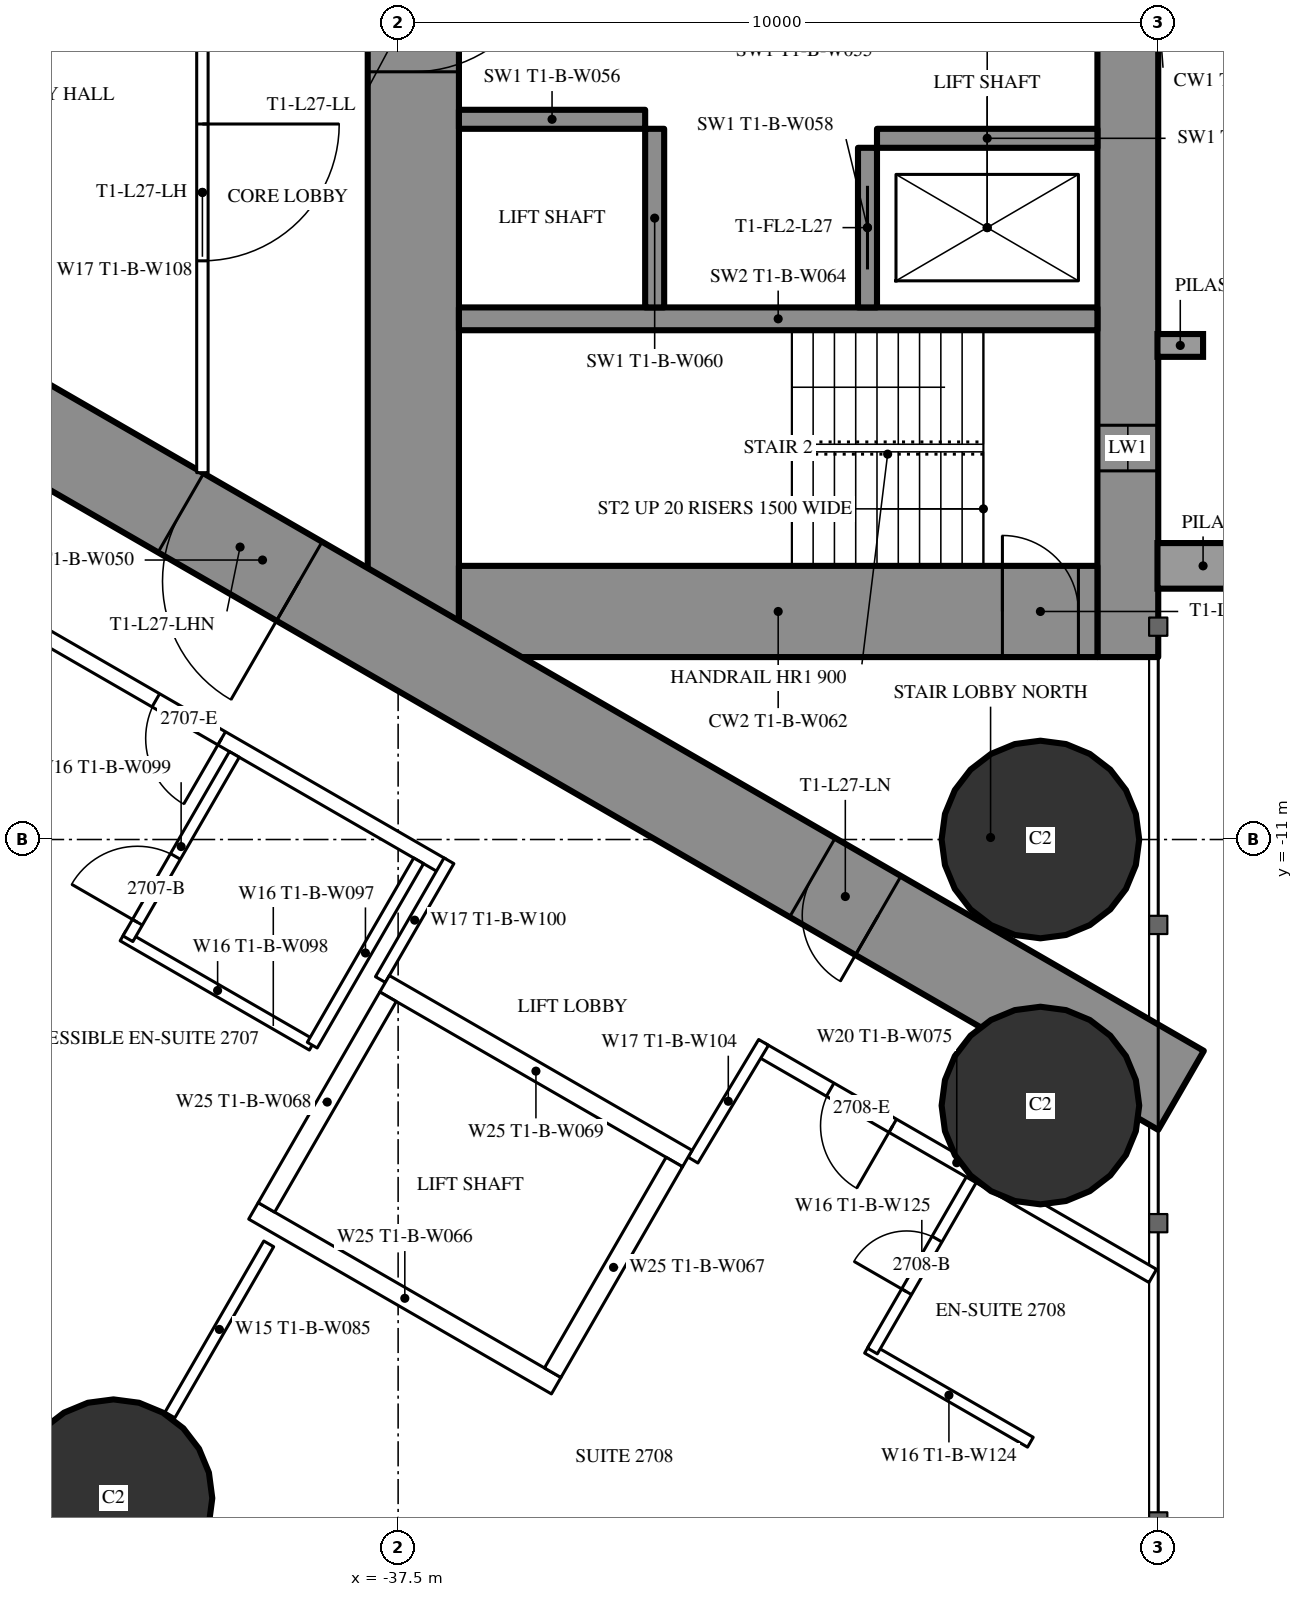
"""IFC4 building model, lengths in metres.
Left out: names, types, materials, properties, quantities, classifications, styles, units other than length and angle.
Written with IfcOpenShell. Run it as: python <this file> out.ifc"""

import sys

from ifc_helpers import new_model, si_unit, direction, frame, frame_2d, origin, origin_2d, place, context, subcontext, project, spatial, rectangle, hollow_circle, extrude, element, fill, save


model = new_model("IFC4")
c1 = context("Model", 3, precision=1e-05, world=origin(), true_north=direction((0.0, 1.0)))
c2 = subcontext(c1, "Body", "Model", "MODEL_VIEW")
j1 = project(units=[si_unit("LENGTHUNIT", "METRE"), si_unit("PLANEANGLEUNIT", "RADIAN")], contexts=[c1])
p1 = place(None, origin())
s1 = spatial("IfcSite", under=j1, at=p1, CompositionType="ELEMENT")
p2 = place(p1, origin())
s2 = spatial("IfcBuilding", under=s1, at=p2, CompositionType="ELEMENT")
p3 = place(p2, frame((0.0, 0.0, 104.6)))
s3 = spatial("IfcBuildingStorey", under=s2, at=p3, CompositionType="ELEMENT", Elevation=104.6)
for number, where, z_axis, x_axis in (
    (1, (-29.05, -11.0, 0.0), (0.0, 0.0, 1.0), (1.0, 0.0, 0.0)),
    (2, (-29.05, -14.5, 0.0), (0.0, 0.0, 1.0), (1.0, 0.0, 0.0)),
    (3, (-41.245, -19.666, 0.0), (0.0, 0.0, 1.0), (1.0, 0.0, 0.0)),
):
    element("IfcColumn", number, at=place(p3, frame(where, z_axis=z_axis, x_axis=x_axis)), inside=s3, PredefinedType="COLUMN", context=c2, shape_type="SweptSolid", body=[
        extrude(hollow_circle(Radius=1.3, WallThickness=0.1, at=origin_2d()), origin(), (0.0, 0.0, 1.0), 3.5),
    ])
p4 = place(p3, frame((-27.9, 8.6, 0.0), z_axis=(0.0, 0.0, 1.0), x_axis=(0.0, -1.0, 0.0)))
e4 = element("IfcWall", 4, at=p4, inside=s3, PredefinedType="SHEAR", context=c2, shape_type="SweptSolid", body=[
    extrude(rectangle(XDim=17.2, YDim=0.8, at=frame_2d((8.6, 0.0))), origin(), (0.0, 0.0, 1.0), 3.5),
])
p5 = place(p4, frame((2.45, 0.0, 0.6)))
e5 = element("IfcOpeningElement", 5, at=p5, cuts=e4, PredefinedType="OPENING", context=c2, shape_type="SweptSolid", body=[
    extrude(rectangle(XDim=0.6, YDim=2.1, at=frame_2d((0.3, 1.05))), frame((0.0, 0.41, 0.0), z_axis=(0.0, -1.0, 0.0), x_axis=(1.0, 0.0, 0.0)), (0.0, 0.0, 1.0), 0.82),
])
p6 = place(p4, frame((14.15, 0.0, 0.6)))
e6 = element("IfcOpeningElement", 6, at=p6, cuts=e4, PredefinedType="OPENING", context=c2, shape_type="SweptSolid", body=[
    extrude(rectangle(XDim=0.6, YDim=2.1, at=frame_2d((0.3, 1.05))), frame((0.0, 0.41, 0.0), z_axis=(0.0, -1.0, 0.0), x_axis=(1.0, 0.0, 0.0)), (0.0, 0.0, 1.0), 0.82),
])
p7 = place(p3, frame((-37.3, 8.6, 0.0), z_axis=(0.0, 0.0, 1.0), x_axis=(0.0, -1.0, 0.0)))
e7 = element("IfcWall", 7, at=p7, inside=s3, PredefinedType="SHEAR", context=c2, shape_type="SweptSolid", body=[
    extrude(rectangle(XDim=17.2, YDim=1.2, at=frame_2d((8.6, 0.0))), origin(), (0.0, 0.0, 1.0), 3.5),
])
p8 = place(p7, frame((7.7, 0.0, 0.0)))
e8 = element("IfcOpeningElement", 8, at=p8, cuts=e7, PredefinedType="OPENING", context=c2, shape_type="SweptSolid", body=[
    extrude(rectangle(XDim=1.8, YDim=2.2, at=frame_2d((0.9, 1.1))), frame((0.0, 0.61, 0.0), z_axis=(0.0, -1.0, 0.0), x_axis=(1.0, 0.0, 0.0)), (0.0, 0.0, 1.0), 1.22),
])
p9 = place(p3, frame((-28.3, -8.0, 0.0), z_axis=(0.0, 0.0, 1.0), x_axis=(-1.0, 0.0, 0.0)))
e9 = element("IfcWall", 9, at=p9, inside=s3, PredefinedType="SHEAR", context=c2, shape_type="SweptSolid", body=[
    extrude(rectangle(XDim=8.4, YDim=1.2, at=frame_2d((4.2, 0.0))), origin(), (0.0, 0.0, 1.0), 3.5),
])
p10 = place(p9, frame((0.25, 0.0, 0.0)))
e10 = element("IfcOpeningElement", 10, at=p10, cuts=e9, PredefinedType="OPENING", context=c2, shape_type="SweptSolid", body=[
    extrude(rectangle(XDim=1.0, YDim=2.2, at=frame_2d((0.5, 1.1))), frame((0.0, 0.61, 0.0), z_axis=(0.0, -1.0, 0.0), x_axis=(1.0, 0.0, 0.0)), (0.0, 0.0, 1.0), 1.22),
])
p11 = place(p3, frame((-28.3, -4.15, 0.0), z_axis=(0.0, 0.0, 1.0), x_axis=(-1.0, 0.0, 0.0)))
e11 = element("IfcWall", 11, at=p11, inside=s3, PredefinedType="SHEAR", context=c2, shape_type="SweptSolid", body=[
    extrude(rectangle(XDim=8.4, YDim=0.3, at=frame_2d((4.2, 0.0))), origin(), (0.0, 0.0, 1.0), 3.5),
])
p12 = place(p3, frame((-31.325, -1.9, 0.0), z_axis=(0.0, 0.0, 1.0), x_axis=(0.0, -1.0, 0.0)))
e12 = element("IfcWall", 12, at=p12, inside=s3, PredefinedType="SHEAR", context=c2, shape_type="SweptSolid", body=[
    extrude(rectangle(XDim=2.1, YDim=0.25, at=frame_2d((1.05, 0.0))), origin(), (0.0, 0.0, 1.0), 3.5),
])
p13 = place(p12, frame((0.5, 0.0, 0.0)))
e13 = element("IfcOpeningElement", 13, at=p13, cuts=e12, PredefinedType="OPENING", context=c2, shape_type="SweptSolid", body=[
    extrude(rectangle(XDim=1.1, YDim=2.2, at=frame_2d((0.55, 1.1))), frame((0.0, 0.135, 0.0), z_axis=(0.0, -1.0, 0.0), x_axis=(1.0, 0.0, 0.0)), (0.0, 0.0, 1.0), 0.27),
])
p14 = place(p3, frame((-34.125, -1.65, 0.0), z_axis=(0.0, 0.0, 1.0), x_axis=(0.0, -1.0, 0.0)))
e14 = element("IfcWall", 14, at=p14, inside=s3, PredefinedType="SHEAR", context=c2, shape_type="SweptSolid", body=[
    extrude(rectangle(XDim=2.35, YDim=0.25, at=frame_2d((1.175, 0.0))), origin(), (0.0, 0.0, 1.0), 3.5),
])
p15 = place(p3, frame((-28.3, -1.775, 0.0), z_axis=(0.0, 0.0, 1.0), x_axis=(-1.0, 0.0, 0.0)))
e15 = element("IfcWall", 15, at=p15, inside=s3, PredefinedType="SHEAR", context=c2, shape_type="SweptSolid", body=[
    extrude(rectangle(XDim=2.9, YDim=0.25, at=frame_2d((1.45, 0.0))), origin(), (0.0, 0.0, 1.0), 3.5),
])
p16 = place(p3, frame((-34.25, -1.525, 0.0), z_axis=(0.0, 0.0, 1.0), x_axis=(-1.0, 0.0, 0.0)))
e16 = element("IfcWall", 16, at=p16, inside=s3, PredefinedType="SHEAR", context=c2, shape_type="SweptSolid", body=[
    extrude(rectangle(XDim=2.45, YDim=0.25, at=frame_2d((1.225, 0.0))), origin(), (0.0, 0.0, 1.0), 3.5),
])
p17 = place(p3, frame((-27.2, 14.3, 0.0), z_axis=(0.0, 0.0, 1.0), x_axis=(-0.866026593062, -0.499997940104, 0.0)))
e17 = element("IfcWall", 17, at=p17, inside=s3, PredefinedType="SHEAR", context=c2, shape_type="SweptSolid", body=[
    extrude(rectangle(XDim=28.946, YDim=1.2, at=frame_2d((14.473, 0.0))), origin(), (0.0, 0.0, 1.0), 3.5),
])
p18 = place(p17, frame((4.6, 0.0, 0.0)))
e18 = element("IfcOpeningElement", 18, at=p18, cuts=e17, PredefinedType="OPENING", context=c2, shape_type="SweptSolid", body=[
    extrude(rectangle(XDim=1.0, YDim=2.2, at=frame_2d((0.5, 1.1))), frame((0.0, 0.61, 0.0), z_axis=(0.0, -1.0, 0.0), x_axis=(1.0, 0.0, 0.0)), (0.0, 0.0, 1.0), 1.22),
])
p19 = place(p17, frame((13.395, 0.0, 0.0)))
e19 = element("IfcOpeningElement", 19, at=p19, cuts=e17, PredefinedType="OPENING", context=c2, shape_type="SweptSolid", body=[
    extrude(rectangle(XDim=1.8, YDim=2.2, at=frame_2d((0.9, 1.1))), frame((0.0, 0.61, 0.0), z_axis=(0.0, -1.0, 0.0), x_axis=(1.0, 0.0, 0.0)), (0.0, 0.0, 1.0), 1.22),
])
p20 = place(p3, frame((-27.2, -14.3, 0.0), z_axis=(0.0, 0.0, 1.0), x_axis=(-0.866024021859, 0.500002393557, 0.0)))
e20 = element("IfcWall", 20, at=p20, inside=s3, PredefinedType="SHEAR", context=c2, shape_type="SweptSolid", body=[
    extrude(rectangle(XDim=27.907, YDim=1.2, at=frame_2d((13.954, 0.0))), origin(), (0.0, 0.0, 1.0), 3.5),
])
p21 = place(p20, frame((4.6, 0.0, 0.0)))
e21 = element("IfcOpeningElement", 21, at=p21, cuts=e20, PredefinedType="OPENING", context=c2, shape_type="SweptSolid", body=[
    extrude(rectangle(XDim=1.0, YDim=2.2, at=frame_2d((0.5, 1.1))), frame((0.0, 0.61, 0.0), z_axis=(0.0, -1.0, 0.0), x_axis=(1.0, 0.0, 0.0)), (0.0, 0.0, 1.0), 1.22),
])
p22 = place(p20, frame((13.395, 0.0, 0.0)))
e22 = element("IfcOpeningElement", 22, at=p22, cuts=e20, PredefinedType="OPENING", context=c2, shape_type="SweptSolid", body=[
    extrude(rectangle(XDim=1.8, YDim=2.2, at=frame_2d((0.9, 1.1))), frame((0.0, 0.61, 0.0), z_axis=(0.0, -1.0, 0.0), x_axis=(1.0, 0.0, 0.0)), (0.0, 0.0, 1.0), 1.22),
])
p23 = place(p3, frame((-39.202, -16.32, 0.0), z_axis=(0.0, 0.0, 1.0), x_axis=(-0.49997716683, -0.86603858612, 0.0)))
e23 = element("IfcWall", 23, at=p23, inside=s3, PredefinedType="PARTITIONING", context=c2, shape_type="SweptSolid", body=[
    extrude(rectangle(XDim=2.6, YDim=0.15, at=frame_2d((1.3, 0.0))), origin(), (0.0, 0.0, 1.0), 3.25),
])
p24 = place(p3, frame((-27.572, -16.741, 0.0), z_axis=(0.0, 0.0, 1.0), x_axis=(-0.866024464444, 0.500001626982, 0.0)))
e24 = element("IfcWall", 24, at=p24, inside=s3, PredefinedType="PARTITIONING", context=c2, shape_type="SweptSolid", body=[
    extrude(rectangle(XDim=5.955, YDim=0.2, at=frame_2d((2.978, 0.0))), origin(), (0.0, 0.0, 1.0), 3.25),
])
p25 = place(p24, frame((3.95, 0.0, 0.0)))
e25 = element("IfcOpeningElement", 25, at=p25, cuts=e24, PredefinedType="OPENING", context=c2, shape_type="SweptSolid", body=[
    extrude(rectangle(XDim=0.95, YDim=2.2, at=frame_2d((0.475, 1.1))), frame((0.0, 0.11, 0.0), z_axis=(0.0, -1.0, 0.0), x_axis=(1.0, 0.0, 0.0)), (0.0, 0.0, 1.0), 0.22),
])
p26 = place(p3, frame((-36.92, -11.344, 0.0), z_axis=(0.0, 0.0, 1.0), x_axis=(-0.866028313256, 0.499994960614, 0.0)))
e26 = element("IfcWall", 26, at=p26, inside=s3, PredefinedType="PARTITIONING", context=c2, shape_type="SweptSolid", body=[
    extrude(rectangle(XDim=22.568, YDim=0.2, at=frame_2d((11.284, 0.0))), origin(), (0.0, 0.0, 1.0), 3.25),
])
p27 = place(p26, frame((21.018, 0.0, 0.0)))
e27 = element("IfcOpeningElement", 27, at=p27, cuts=e26, PredefinedType="OPENING", context=c2, shape_type="SweptSolid", body=[
    extrude(rectangle(XDim=0.95, YDim=2.2, at=frame_2d((0.475, 1.1))), frame((0.0, 0.11, 0.0), z_axis=(0.0, -1.0, 0.0), x_axis=(1.0, 0.0, 0.0)), (0.0, 0.0, 1.0), 0.22),
])
p28 = place(p26, frame((3.35, 0.0, 0.0)))
e28 = element("IfcOpeningElement", 28, at=p28, cuts=e26, PredefinedType="OPENING", context=c2, shape_type="SweptSolid", body=[
    extrude(rectangle(XDim=1.0, YDim=2.2, at=frame_2d((0.5, 1.1))), frame((0.0, 0.11, 0.0), z_axis=(0.0, -1.0, 0.0), x_axis=(1.0, 0.0, 0.0)), (0.0, 0.0, 1.0), 0.22),
])
p29 = place(p3, frame((-36.831, -11.28, 0.0), z_axis=(0.0, 0.0, 1.0), x_axis=(-0.499937177781, -0.866061671171, 0.0)))
e29 = element("IfcWall", 29, at=p29, inside=s3, PredefinedType="PARTITIONING", context=c2, shape_type="SweptSolid", body=[
    extrude(rectangle(XDim=1.804, YDim=0.15, at=frame_2d((0.902, 0.0))), origin(), (0.0, 0.0, 1.0), 3.25),
])
p30 = place(p3, frame((-33.621, -15.218, 0.0), z_axis=(0.0, 0.0, 1.0), x_axis=(0.514336634837, 0.857588377991, 0.0)))
e30 = element("IfcWall", 30, at=p30, inside=s3, PredefinedType="PARTITIONING", context=c2, shape_type="SweptSolid", body=[
    extrude(rectangle(XDim=1.805, YDim=0.15, at=frame_2d((0.903, 0.0))), origin(), (0.0, 0.0, 1.0), 3.25),
])
p31 = place(p3, frame((-38.63, -13.705, 0.0), z_axis=(0.0, 0.0, 1.0), x_axis=(-0.866018712932, 0.500011588718, 0.0)))
e31 = element("IfcWall", 31, at=p31, inside=s3, PredefinedType="PARTITIONING", context=c2, shape_type="SweptSolid", body=[
    extrude(rectangle(XDim=2.875, YDim=0.15, at=frame_2d((1.438, 0.0))), origin(), (0.0, 0.0, 1.0), 3.25),
])
p32 = place(p3, frame((-39.655, -9.88, 0.0), z_axis=(0.0, 0.0, 1.0), x_axis=(-0.500049511043, -0.865996816683, 0.0)))
e32 = element("IfcWall", 32, at=p32, inside=s3, PredefinedType="PARTITIONING", context=c2, shape_type="SweptSolid", body=[
    extrude(rectangle(XDim=2.8, YDim=0.15, at=frame_2d((1.4, 0.0))), origin(), (0.0, 0.0, 1.0), 3.25),
])
p33 = place(p32, frame((1.55, 0.0, 0.0)))
e33 = element("IfcOpeningElement", 33, at=p33, cuts=e32, PredefinedType="OPENING", context=c2, shape_type="SweptSolid", body=[
    extrude(rectangle(XDim=1.0, YDim=2.2, at=frame_2d((0.5, 1.1))), frame((0.0, 0.085, 0.0), z_axis=(0.0, -1.0, 0.0), x_axis=(1.0, 0.0, 0.0)), (0.0, 0.0, 1.0), 0.17),
])
p34 = place(p3, frame((-37.23, -11.281, 0.0), z_axis=(0.0, 0.0, 1.0), x_axis=(-0.500049511043, -0.865996816683, 0.0)))
e34 = element("IfcWall", 34, at=p34, inside=s3, PredefinedType="PARTITIONING", context=c2, shape_type="SweptSolid", body=[
    extrude(rectangle(XDim=2.8, YDim=0.15, at=frame_2d((1.4, 0.0))), origin(), (0.0, 0.0, 1.0), 3.25),
])
p35 = place(p3, frame((-29.182, -18.929, 0.0), z_axis=(0.0, 0.0, 1.0), x_axis=(-0.866006523861, 0.500032699561, 0.0)))
e35 = element("IfcWall", 35, at=p35, inside=s3, PredefinedType="PARTITIONING", context=c2, shape_type="SweptSolid", body=[
    extrude(rectangle(XDim=2.475, YDim=0.15, at=frame_2d((1.237, 0.0))), origin(), (0.0, 0.0, 1.0), 3.25),
])
p36 = place(p3, frame((-29.96, -15.478, 0.0), z_axis=(0.0, 0.0, 1.0), x_axis=(-0.500006934395, -0.866021400173, 0.0)))
e36 = element("IfcWall", 36, at=p36, inside=s3, PredefinedType="PARTITIONING", context=c2, shape_type="SweptSolid", body=[
    extrude(rectangle(XDim=2.6, YDim=0.15, at=frame_2d((1.3, 0.0))), origin(), (0.0, 0.0, 1.0), 3.25),
])
p37 = place(p36, frame((0.9, 0.0, 0.0)))
e37 = element("IfcOpeningElement", 37, at=p37, cuts=e36, PredefinedType="OPENING", context=c2, shape_type="SweptSolid", body=[
    extrude(rectangle(XDim=0.8, YDim=2.2, at=frame_2d((0.4, 1.1))), frame((0.0, 0.085, 0.0), z_axis=(0.0, -1.0, 0.0), x_axis=(1.0, 0.0, 0.0)), (0.0, 0.0, 1.0), 0.17),
])
p38 = place(p3, frame((-40.075, 1.2, 0.0), z_axis=(0.0, 0.0, 1.0), x_axis=(0.0, -1.0, 0.0)))
e38 = element("IfcWall", 38, at=p38, inside=s3, PredefinedType="PARTITIONING", context=c2, shape_type="SweptSolid", body=[
    extrude(rectangle(XDim=7.374, YDim=0.15, at=frame_2d((3.687, 0.0))), origin(), (0.0, 0.0, 1.0), 3.25),
])
p39 = place(p38, frame((2.787, 0.0, 0.0)))
e39 = element("IfcOpeningElement", 39, at=p39, cuts=e38, PredefinedType="OPENING", context=c2, shape_type="SweptSolid", body=[
    extrude(rectangle(XDim=1.8, YDim=2.2, at=frame_2d((0.9, 1.1))), frame((0.0, 0.085, 0.0), z_axis=(0.0, -1.0, 0.0), x_axis=(1.0, 0.0, 0.0)), (0.0, 0.0, 1.0), 0.17),
])
p40 = place(p3, frame((-33.696, -15.197, 0.0), z_axis=(0.0, 0.0, 1.0), x_axis=(-0.865976953817, 0.500083908417, 0.0)))
e40 = element("IfcWall", 40, at=p40, inside=s3, PredefinedType="PARTITIONING", context=c2, shape_type="SweptSolid", body=[
    extrude(rectangle(XDim=4.599, YDim=0.25, at=frame_2d((2.3, 0.0))), origin(), (0.0, 0.0, 1.0), 3.25),
])
p41 = place(p3, frame((-35.42, -18.186, 0.0), z_axis=(0.0, 0.0, 1.0), x_axis=(-0.865990227814, 0.50006092162, 0.0)))
e41 = element("IfcWall", 41, at=p41, inside=s3, PredefinedType="PARTITIONING", context=c2, shape_type="SweptSolid", body=[
    extrude(rectangle(XDim=4.6, YDim=0.25, at=frame_2d((2.3, 0.0))), origin(), (0.0, 0.0, 1.0), 3.25),
])
p42 = place(p3, frame((-33.866, -15.243, 0.0), z_axis=(0.0, 0.0, 1.0), x_axis=(-0.499929347863, -0.866066190972, 0.0)))
e42 = element("IfcWall", 42, at=p42, inside=s3, PredefinedType="PARTITIONING", context=c2, shape_type="SweptSolid", body=[
    extrude(rectangle(XDim=3.201, YDim=0.25, at=frame_2d((1.6, 0.0))), origin(), (0.0, 0.0, 1.0), 3.25),
])
p43 = place(p3, frame((-37.633, -13.068, 0.0), z_axis=(0.0, 0.0, 1.0), x_axis=(-0.499872130319, -0.866099216793, 0.0)))
e43 = element("IfcWall", 43, at=p43, inside=s3, PredefinedType="PARTITIONING", context=c2, shape_type="SweptSolid", body=[
    extrude(rectangle(XDim=3.2, YDim=0.25, at=frame_2d((1.6, 0.0))), origin(), (0.0, 0.0, 1.0), 3.25),
])
p44 = place(p33, origin())
e44 = element("IfcDoor", 44, at=p44, inside=s3, OperationType="SINGLE_SWING_RIGHT", PredefinedType="DOOR", context=c2, shape_type="SweptSolid", body=[
    extrude(rectangle(XDim=1.0, YDim=2.2, at=frame_2d((0.5, 1.1))), frame((0.0, 0.025, 0.0), z_axis=(0.0, -1.0, 0.0), x_axis=(1.0, 0.0, 0.0)), (0.0, 0.0, 1.0), 0.05),
])
fill(e33, e44)
p45 = place(p28, origin())
e45 = element("IfcDoor", 45, at=p45, inside=s3, OperationType="SINGLE_SWING_LEFT", PredefinedType="DOOR", context=c2, shape_type="SweptSolid", body=[
    extrude(rectangle(XDim=1.0, YDim=2.2, at=frame_2d((0.5, 1.1))), frame((0.0, 0.025, 0.0), z_axis=(0.0, -1.0, 0.0), x_axis=(1.0, 0.0, 0.0)), (0.0, 0.0, 1.0), 0.05),
])
fill(e28, e45)
p46 = place(p37, origin())
e46 = element("IfcDoor", 46, at=p46, inside=s3, OperationType="SINGLE_SWING_RIGHT", PredefinedType="DOOR", context=c2, shape_type="SweptSolid", body=[
    extrude(rectangle(XDim=0.8, YDim=2.2, at=frame_2d((0.4, 1.1))), frame((0.0, 0.025, 0.0), z_axis=(0.0, -1.0, 0.0), x_axis=(1.0, 0.0, 0.0)), (0.0, 0.0, 1.0), 0.05),
])
fill(e37, e46)
p47 = place(p25, origin())
e47 = element("IfcDoor", 47, at=p47, inside=s3, OperationType="SINGLE_SWING_LEFT", PredefinedType="DOOR", context=c2, shape_type="SweptSolid", body=[
    extrude(rectangle(XDim=0.95, YDim=2.2, at=frame_2d((0.475, 1.1))), frame((0.0, 0.025, 0.0), z_axis=(0.0, -1.0, 0.0), x_axis=(1.0, 0.0, 0.0)), (0.0, 0.0, 1.0), 0.05),
])
fill(e25, e47)
p48 = place(p39, origin())
e48 = element("IfcDoor", 48, at=p48, inside=s3, OperationType="DOUBLE_DOOR_SINGLE_SWING", PredefinedType="DOOR", context=c2, shape_type="SweptSolid", body=[
    extrude(rectangle(XDim=1.8, YDim=2.2, at=frame_2d((0.9, 1.1))), frame((0.0, 0.025, 0.0), z_axis=(0.0, -1.0, 0.0), x_axis=(1.0, 0.0, 0.0)), (0.0, 0.0, 1.0), 0.05),
])
fill(e39, e48)
p49 = place(p21, origin())
e49 = element("IfcDoor", 49, at=p49, inside=s3, OperationType="SINGLE_SWING_LEFT", PredefinedType="DOOR", context=c2, shape_type="SweptSolid", body=[
    extrude(rectangle(XDim=1.0, YDim=2.2, at=frame_2d((0.5, 1.1))), frame((0.0, 0.025, 0.0), z_axis=(0.0, -1.0, 0.0), x_axis=(1.0, 0.0, 0.0)), (0.0, 0.0, 1.0), 0.05),
])
fill(e21, e49)
p50 = place(p22, origin())
e50 = element("IfcDoor", 50, at=p50, inside=s3, OperationType="DOUBLE_DOOR_SINGLE_SWING", PredefinedType="DOOR", context=c2, shape_type="SweptSolid", body=[
    extrude(rectangle(XDim=1.8, YDim=2.2, at=frame_2d((0.9, 1.1))), frame((0.0, 0.025, 0.0), z_axis=(0.0, -1.0, 0.0), x_axis=(1.0, 0.0, 0.0)), (0.0, 0.0, 1.0), 0.05),
])
fill(e22, e50)
p51 = place(p8, origin())
e51 = element("IfcDoor", 51, at=p51, inside=s3, OperationType="DOUBLE_DOOR_SINGLE_SWING", PredefinedType="DOOR", context=c2, shape_type="SweptSolid", body=[
    extrude(rectangle(XDim=1.8, YDim=2.2, at=frame_2d((0.9, 1.1))), frame((0.0, 0.025, 0.0), z_axis=(0.0, -1.0, 0.0), x_axis=(1.0, 0.0, 0.0)), (0.0, 0.0, 1.0), 0.05),
])
fill(e8, e51)
p52 = place(p10, origin())
e52 = element("IfcDoor", 52, at=p52, inside=s3, OperationType="SINGLE_SWING_RIGHT", PredefinedType="DOOR", context=c2, shape_type="SweptSolid", body=[
    extrude(rectangle(XDim=1.0, YDim=2.2, at=frame_2d((0.5, 1.1))), frame((0.0, 0.025, 0.0), z_axis=(0.0, -1.0, 0.0), x_axis=(1.0, 0.0, 0.0)), (0.0, 0.0, 1.0), 0.05),
])
fill(e10, e52)
p53 = place(p13, origin())
e53 = element("IfcDoor", 53, at=p53, inside=s3, OperationType="SLIDING_TO_LEFT", PredefinedType="USERDEFINED", context=c2, shape_type="SweptSolid", body=[
    extrude(rectangle(XDim=1.1, YDim=2.2, at=frame_2d((0.55, 1.1))), frame((0.0, 0.025, 0.0), z_axis=(0.0, -1.0, 0.0), x_axis=(1.0, 0.0, 0.0)), (0.0, 0.0, 1.0), 0.05),
])
fill(e13, e53)
p54 = place(p6, origin())
e54 = element("IfcWindow", 54, at=p54, inside=s3, PartitioningType="SINGLE_PANEL", PredefinedType="WINDOW", context=c2, shape_type="SweptSolid", body=[
    extrude(rectangle(XDim=0.6, YDim=2.1, at=frame_2d((0.3, 1.05))), frame((0.0, 0.03, 0.0), z_axis=(0.0, -1.0, 0.0), x_axis=(1.0, 0.0, 0.0)), (0.0, 0.0, 1.0), 0.06),
])
fill(e6, e54)
save(model, sys.argv[1])
